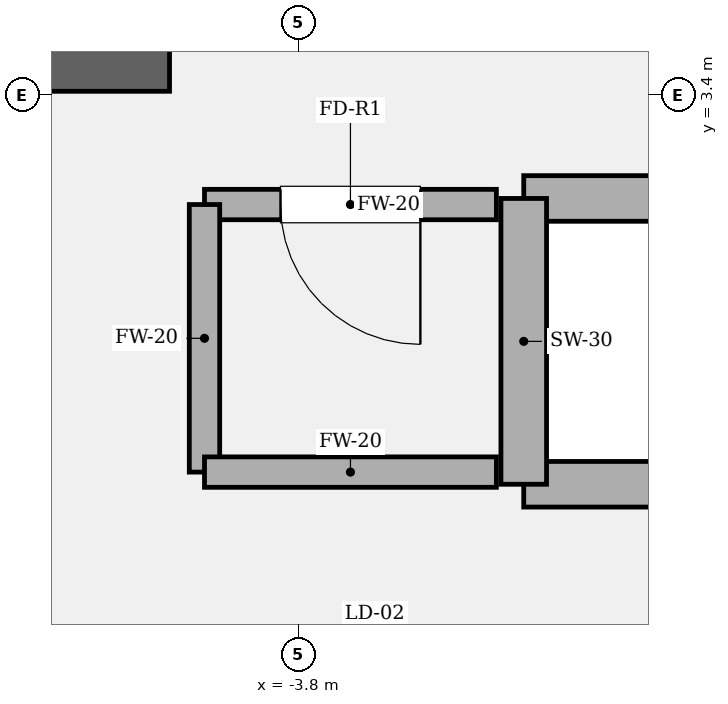
"""IFC4 building model, lengths in metres.
Left out: names, types, materials, properties, quantities, classifications, styles, units other than length and angle.
Written with IfcOpenShell. Run it as: python <this file> out.ifc"""

import sys

from ifc_helpers import new_model, si_unit, direction, frame, frame_2d, origin, place, context, subcontext, project, spatial, rectangle, extrude, element, fill, save


model = new_model("IFC4")
c1 = context("Model", 3, precision=1e-05, world=origin(), true_north=direction((0.0, 1.0)))
c2 = subcontext(c1, "Body", "Model", "MODEL_VIEW")
j1 = project(units=[si_unit("LENGTHUNIT", "METRE"), si_unit("PLANEANGLEUNIT", "RADIAN")], contexts=[c1])
p1 = place(None, origin())
s1 = spatial("IfcSite", under=j1, at=p1, CompositionType="ELEMENT")
p2 = place(p1, origin())
s2 = spatial("IfcBuilding", under=s1, at=p2, CompositionType="ELEMENT")
p3 = place(p2, frame((0.0, 0.0, 275.7)))
s3 = spatial("IfcBuildingStorey", under=s2, at=p3, CompositionType="ELEMENT", Elevation=275.7)
p4 = place(p3, frame((-9.925, 3.6, 0.0), z_axis=(0.0, 0.0, 1.0), x_axis=(1.0, 0.0, 0.0)))
e1 = element("IfcWall", 1, at=p4, inside=s3, PredefinedType="SOLIDWALL", context=c2, shape_type="SweptSolid", body=[
    extrude(rectangle(XDim=5.275, YDim=0.35, at=frame_2d((2.638, 0.0))), origin(), (0.0, 0.0, 1.0), 4.05),
])
for number, where, z_axis, x_axis in (
    (2, (-2.32, 0.84, 0.0), (0.0, 0.0, 1.0), (1.0, 0.0, 0.0)),
    (3, (-2.32, 2.72, 0.0), (0.0, 0.0, 1.0), (1.0, 0.0, 0.0)),
):
    element("IfcWall", number, at=place(p3, frame(where, z_axis=z_axis, x_axis=x_axis)), inside=s3, PredefinedType="SOLIDWALL", context=c2, shape_type="SweptSolid", body=[
        extrude(rectangle(XDim=4.64, YDim=0.3, at=frame_2d((2.32, 0.0))), origin(), (0.0, 0.0, 1.0), 3.85),
    ])
p5 = place(p3, frame((-2.32, 0.84, 0.0), z_axis=(0.0, 0.0, 1.0), x_axis=(0.0, 1.0, 0.0)))
e4 = element("IfcWall", 4, at=p5, inside=s3, PredefinedType="SOLIDWALL", context=c2, shape_type="SweptSolid", body=[
    extrude(rectangle(XDim=1.88, YDim=0.3, at=frame_2d((0.94, 0.0))), origin(), (0.0, 0.0, 1.0), 3.85),
])
p6 = place(p3, frame((-2.5, 2.68, 0.0), z_axis=(0.0, 0.0, 1.0), x_axis=(-1.0, 0.0, 0.0)))
e5 = element("IfcWall", 5, at=p6, inside=s3, PredefinedType="SOLIDWALL", context=c2, shape_type="SweptSolid", body=[
    extrude(rectangle(XDim=1.92, YDim=0.2, at=frame_2d((0.96, 0.0))), origin(), (0.0, 0.0, 1.0), 3.85),
])
p7 = place(p6, frame((0.5, 0.0, 0.0)))
e6 = element("IfcOpeningElement", 6, at=p7, cuts=e5, PredefinedType="OPENING", context=c2, shape_type="SweptSolid", body=[
    extrude(rectangle(XDim=0.92, YDim=2.1, at=frame_2d((0.46, 1.05))), frame((0.0, 0.11, 0.0), z_axis=(0.0, -1.0, 0.0), x_axis=(1.0, 0.0, 0.0)), (0.0, 0.0, 1.0), 0.22),
])
p8 = place(p3, frame((-4.42, 2.68, 0.0), z_axis=(0.0, 0.0, 1.0), x_axis=(0.0, -1.0, 0.0)))
e7 = element("IfcWall", 7, at=p8, inside=s3, PredefinedType="SOLIDWALL", context=c2, shape_type="SweptSolid", body=[
    extrude(rectangle(XDim=1.76, YDim=0.2, at=frame_2d((0.88, 0.0))), origin(), (0.0, 0.0, 1.0), 3.85),
])
p9 = place(p3, frame((-4.42, 0.92, 0.0), z_axis=(0.0, 0.0, 1.0), x_axis=(1.0, 0.0, 0.0)))
e8 = element("IfcWall", 8, at=p9, inside=s3, PredefinedType="SOLIDWALL", context=c2, shape_type="SweptSolid", body=[
    extrude(rectangle(XDim=1.92, YDim=0.2, at=frame_2d((0.96, 0.0))), origin(), (0.0, 0.0, 1.0), 3.85),
])
p10 = place(p7, origin())
e9 = element("IfcDoor", 9, at=p10, inside=s3, OperationType="SINGLE_SWING_LEFT", PredefinedType="DOOR", context=c2, shape_type="SweptSolid", body=[
    extrude(rectangle(XDim=0.92, YDim=2.1, at=frame_2d((0.46, 1.05))), frame((0.0, 0.025, 0.0), z_axis=(0.0, -1.0, 0.0), x_axis=(1.0, 0.0, 0.0)), (0.0, 0.0, 1.0), 0.05),
])
fill(e6, e9)
save(model, sys.argv[1])
